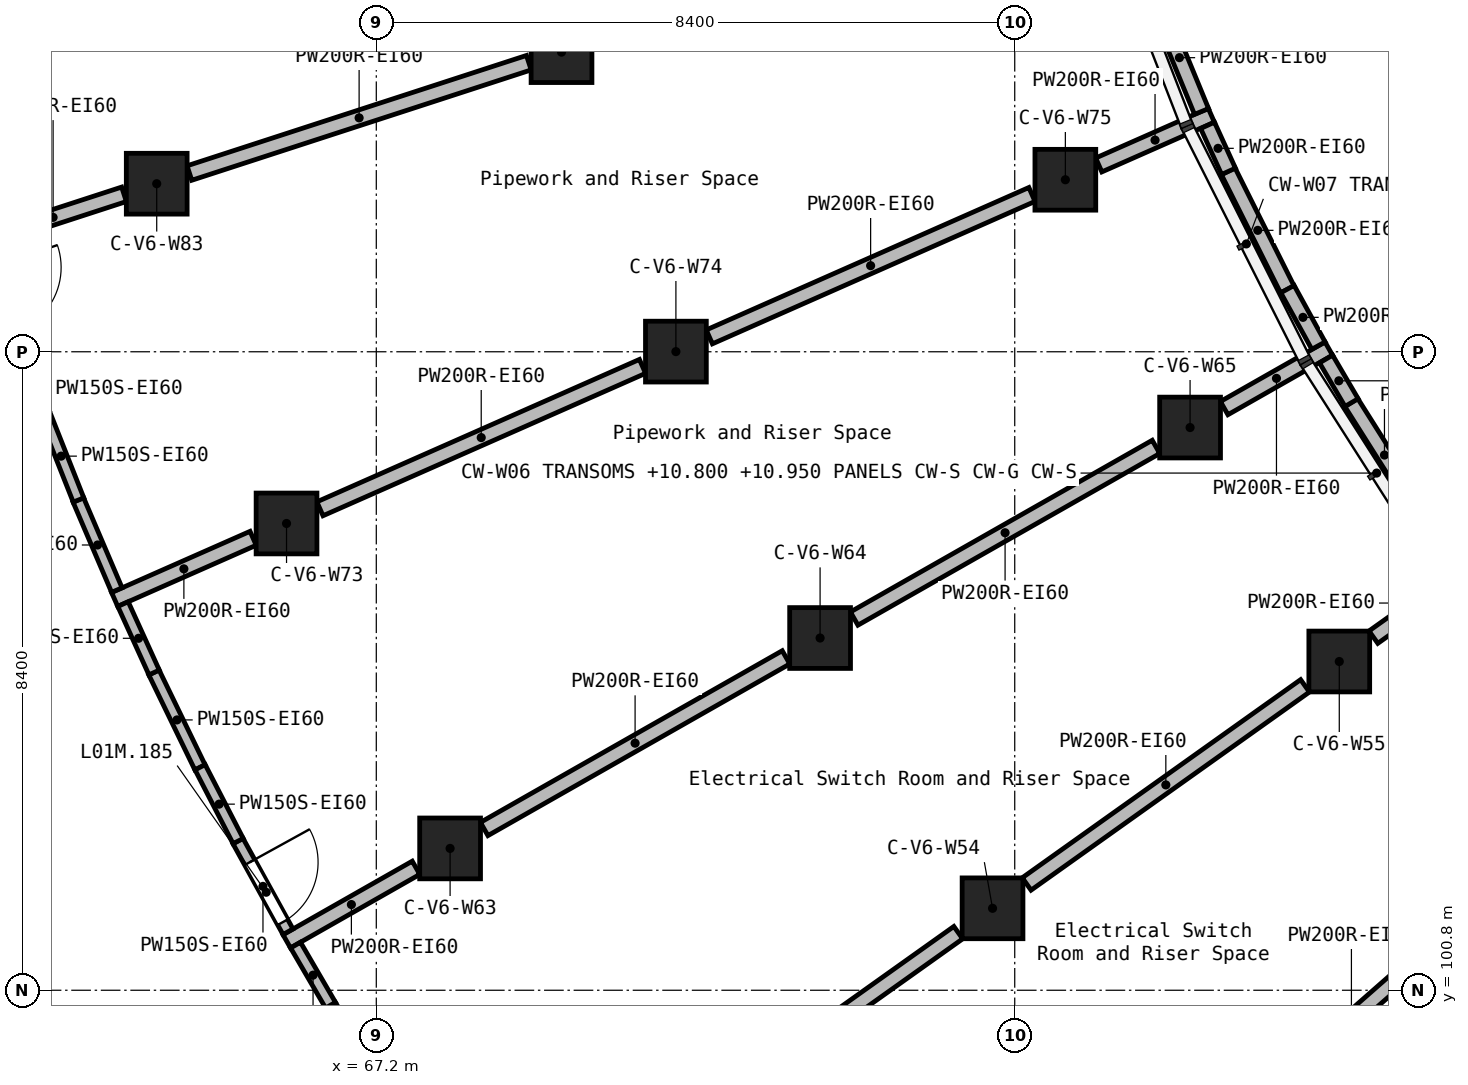
"""IFC4 building model, lengths in metres.
Left out: names, types, materials, properties, quantities, classifications, styles, units other than length and angle.
Written with IfcOpenShell. Run it as: python <this file> out.ifc"""

import sys

from ifc_helpers import new_model, si_unit, direction, frame, frame_2d, origin, origin_2d, place, context, subcontext, project, spatial, rectangle, extrude, element, fill, save


model = new_model("IFC4")
c1 = context("Model", 3, precision=1e-05, world=origin(), true_north=direction((0.0, 1.0)))
c2 = subcontext(c1, "Body", "Model", "MODEL_VIEW")
j1 = project(units=[si_unit("LENGTHUNIT", "METRE"), si_unit("PLANEANGLEUNIT", "RADIAN")], contexts=[c1])
p1 = place(None, origin())
s1 = spatial("IfcSite", under=j1, at=p1, CompositionType="ELEMENT")
p2 = place(p1, origin())
s2 = spatial("IfcBuilding", under=s1, at=p2, CompositionType="ELEMENT")
p3 = place(p2, frame((0.0, 0.0, 9.9)))
s3 = spatial("IfcBuildingStorey", under=s2, at=p3, CompositionType="ELEMENT", Elevation=9.9)
for number, where, z_axis, x_axis in (
    (1, (64.311, 111.411, 0.0), (0.0, 0.0, 1.0), (1.0, 0.0, 0.0)),
    (2, (66.019, 106.941, 0.0), (0.0, 0.0, 1.0), (1.0, 0.0, 0.0)),
    (3, (68.171, 102.666, 0.0), (0.0, 0.0, 1.0), (1.0, 0.0, 0.0)),
    (4, (69.637, 113.142, 0.0), (0.0, 0.0, 1.0), (1.0, 0.0, 0.0)),
    (5, (71.142, 109.202, 0.0), (0.0, 0.0, 1.0), (1.0, 0.0, 0.0)),
    (6, (73.039, 105.434, 0.0), (0.0, 0.0, 1.0), (1.0, 0.0, 0.0)),
    (7, (75.308, 101.878, 0.0), (0.0, 0.0, 1.0), (1.0, 0.0, 0.0)),
    (8, (76.266, 111.463, 0.0), (0.0, 0.0, 1.0), (1.0, 0.0, 0.0)),
    (9, (77.907, 108.203, 0.0), (0.0, 0.0, 1.0), (1.0, 0.0, 0.0)),
    (10, (79.87, 105.125, 0.0), (0.0, 0.0, 1.0), (1.0, 0.0, 0.0)),
):
    element("IfcColumn", number, at=place(p3, frame(where, z_axis=z_axis, x_axis=x_axis)), inside=s3, PredefinedType="COLUMN", context=c2, shape_type="SweptSolid", body=[
        extrude(rectangle(XDim=0.8, YDim=0.8, at=origin_2d()), origin(), (0.0, 0.0, 1.0), 2.7),
    ])
p4 = place(p3, frame((63.757, 105.942, 0.0), z_axis=(0.0, 0.0, 1.0), x_axis=(0.91480459559, 0.403896709429, 0.0)))
e11 = element("IfcWall", 11, at=p4, inside=s3, PredefinedType="SOLIDWALL", context=c2, shape_type="SweptSolid", body=[
    extrude(rectangle(XDim=1.992, YDim=0.2, at=frame_2d((0.996, 0.0))), origin(), (0.0, 0.0, 1.0), 2.45),
])
p5 = place(p3, frame((66.458, 107.134, 0.0), z_axis=(0.0, 0.0, 1.0), x_axis=(0.914820027479, 0.403861755213, 0.0)))
e12 = element("IfcWall", 12, at=p5, inside=s3, PredefinedType="SOLIDWALL", context=c2, shape_type="SweptSolid", body=[
    extrude(rectangle(XDim=4.639, YDim=0.2, at=frame_2d((2.32, 0.0))), origin(), (0.0, 0.0, 1.0), 2.45),
])
p6 = place(p3, frame((71.582, 109.396, 0.0), z_axis=(0.0, 0.0, 1.0), x_axis=(0.914834914902, 0.40382803082, 0.0)))
e13 = element("IfcWall", 13, at=p6, inside=s3, PredefinedType="SOLIDWALL", context=c2, shape_type="SweptSolid", body=[
    extrude(rectangle(XDim=4.64, YDim=0.2, at=frame_2d((2.32, 0.0))), origin(), (0.0, 0.0, 1.0), 2.45),
])
p7 = place(p3, frame((76.706, 111.658, 0.0), z_axis=(0.0, 0.0, 1.0), x_axis=(0.914871927274, 0.403744172323, 0.0)))
e14 = element("IfcWall", 14, at=p7, inside=s3, PredefinedType="SOLIDWALL", context=c2, shape_type="SweptSolid", body=[
    extrude(rectangle(XDim=1.619, YDim=0.2, at=frame_2d((0.809, 0.0))), origin(), (0.0, 0.0, 1.0), 2.45),
])
p8 = place(p3, frame((66.022, 101.444, 0.0), z_axis=(0.0, 0.0, 1.0), x_axis=(0.869270144925, 0.494337349532, 0.0)))
e15 = element("IfcWall", 15, at=p8, inside=s3, PredefinedType="SOLIDWALL", context=c2, shape_type="SweptSolid", body=[
    extrude(rectangle(XDim=1.957, YDim=0.2, at=frame_2d((0.979, 0.0))), origin(), (0.0, 0.0, 1.0), 2.45),
])
p9 = place(p3, frame((68.619, 102.921, 0.0), z_axis=(0.0, 0.0, 1.0), x_axis=(0.869273909114, 0.494330730315, 0.0)))
e16 = element("IfcWall", 16, at=p9, inside=s3, PredefinedType="SOLIDWALL", context=c2, shape_type="SweptSolid", body=[
    extrude(rectangle(XDim=4.568, YDim=0.2, at=frame_2d((2.284, 0.0))), origin(), (0.0, 0.0, 1.0), 2.45),
])
p10 = place(p3, frame((73.487, 105.69, 0.0), z_axis=(0.0, 0.0, 1.0), x_axis=(0.869250944646, 0.49437111084, 0.0)))
e17 = element("IfcWall", 17, at=p10, inside=s3, PredefinedType="SOLIDWALL", context=c2, shape_type="SweptSolid", body=[
    extrude(rectangle(XDim=4.569, YDim=0.2, at=frame_2d((2.284, 0.0))), origin(), (0.0, 0.0, 1.0), 2.45),
])
p11 = place(p3, frame((78.355, 108.458, 0.0), z_axis=(0.0, 0.0, 1.0), x_axis=(0.869218667817, 0.49442785876, 0.0)))
e18 = element("IfcWall", 18, at=p11, inside=s3, PredefinedType="SOLIDWALL", context=c2, shape_type="SweptSolid", body=[
    extrude(rectangle(XDim=1.583, YDim=0.2, at=frame_2d((0.792, 0.0))), origin(), (0.0, 0.0, 1.0), 2.45),
])
for number, where, z_axis, x_axis in (
    (19, (71.195, 98.951, 0.0), (0.0, 0.0, 1.0), (0.815, 0.58, 0.0)),
    (20, (75.757, 102.198, 0.0), (0.0, 0.0, 1.0), (0.815, 0.58, 0.0)),
):
    element("IfcWall", number, at=place(p3, frame(where, z_axis=z_axis, x_axis=x_axis)), inside=s3, PredefinedType="SOLIDWALL", context=c2, shape_type="SweptSolid", body=[
        extrude(rectangle(XDim=4.495, YDim=0.2, at=frame_2d((2.248, 0.0))), origin(), (0.0, 0.0, 1.0), 2.45),
    ])
p12 = place(p3, frame((80.319, 105.445, 0.0), z_axis=(0.0, 0.0, 1.0), x_axis=(0.81475502869, 0.579805349428, 0.0)))
e21 = element("IfcWall", 21, at=p12, inside=s3, PredefinedType="SOLIDWALL", context=c2, shape_type="SweptSolid", body=[
    extrude(rectangle(XDim=1.548, YDim=0.2, at=frame_2d((0.774, 0.0))), origin(), (0.0, 0.0, 1.0), 2.45),
])
p13 = place(p3, frame((78.296, 98.896, 0.0), z_axis=(0.0, 0.0, 1.0), x_axis=(0.751815287375, 0.659373773871, 0.0)))
e22 = element("IfcWall", 22, at=p13, inside=s3, PredefinedType="SOLIDWALL", context=c2, shape_type="SweptSolid", body=[
    extrude(rectangle(XDim=4.611, YDim=0.2, at=frame_2d((2.306, 0.0))), origin(), (0.0, 0.0, 1.0), 2.45),
])
p14 = place(p3, frame((62.015, 110.665, 0.0), z_axis=(0.0, 0.0, 1.0), x_axis=(0.950996571819, 0.309201423652, 0.0)))
e23 = element("IfcWall", 23, at=p14, inside=s3, PredefinedType="SOLIDWALL", context=c2, shape_type="SweptSolid", body=[
    extrude(rectangle(XDim=1.962, YDim=0.2, at=frame_2d((0.981, 0.0))), origin(), (0.0, 0.0, 1.0), 2.45),
])
p15 = place(p3, frame((64.741, 111.552, 0.0), z_axis=(0.0, 0.0, 1.0), x_axis=(0.950996999886, 0.309200107065, 0.0)))
e24 = element("IfcWall", 24, at=p15, inside=s3, PredefinedType="SOLIDWALL", context=c2, shape_type="SweptSolid", body=[
    extrude(rectangle(XDim=4.696, YDim=0.2, at=frame_2d((2.348, 0.0))), origin(), (0.0, 0.0, 1.0), 2.45),
])
p16 = place(p3, frame((77.475, 113.777, 0.0), z_axis=(0.0, 0.0, 1.0), x_axis=(0.38058139717, -0.924747425046, 0.0)))
e25 = element("IfcWall", 25, at=p16, inside=s3, PredefinedType="SOLIDWALL", context=c2, shape_type="SweptSolid", body=[
    extrude(rectangle(XDim=1.531, YDim=0.2, at=frame_2d((0.766, 0.0))), origin(), (0.0, 0.0, 1.0), 2.45),
])
p17 = place(p3, frame((78.408, 111.575, 0.0), z_axis=(0.0, 0.0, 1.0), x_axis=(0.447494222103, -0.89428682266, 0.0)))
e26 = element("IfcWall", 26, at=p17, inside=s3, PredefinedType="SOLIDWALL", context=c2, shape_type="SweptSolid", body=[
    extrude(rectangle(XDim=1.74, YDim=0.2, at=frame_2d((0.87, 0.0))), origin(), (0.0, 0.0, 1.0), 2.45),
])
p18 = place(p3, frame((80.028, 108.532, 0.0), z_axis=(0.0, 0.0, 1.0), x_axis=(0.534110896363, -0.84541442523, 0.0)))
e27 = element("IfcWall", 27, at=p18, inside=s3, PredefinedType="SOLIDWALL", context=c2, shape_type="SweptSolid", body=[
    extrude(rectangle(XDim=1.636, YDim=0.2, at=frame_2d((0.818, 0.0))), origin(), (0.0, 0.0, 1.0), 2.45),
])
p19 = place(p3, frame((79.188, 110.024, 0.0), z_axis=(0.0, 0.0, 1.0), x_axis=(0.481089632331, -0.876671412596, 0.0)))
e28 = element("IfcWall", 28, at=p19, inside=s3, PredefinedType="SOLIDWALL", context=c2, shape_type="SweptSolid", body=[
    extrude(rectangle(XDim=0.848, YDim=0.2, at=frame_2d((0.424, 0.0))), origin(), (0.0, 0.0, 1.0), 2.45),
])
p20 = place(p3, frame((78.137, 112.179, 0.0), z_axis=(0.0, 0.0, 1.0), x_axis=(0.414770625864, -0.909926001343, 0.0)))
e29 = element("IfcWall", 29, at=p20, inside=s3, PredefinedType="SOLIDWALL", context=c2, shape_type="SweptSolid", body=[
    extrude(rectangle(XDim=0.665, YDim=0.2, at=frame_2d((0.333, 0.0))), origin(), (0.0, 0.0, 1.0), 2.45),
])
p21 = place(p3, frame((79.696, 109.104, 0.0), z_axis=(0.0, 0.0, 1.0), x_axis=(0.505493047434, -0.862830678057, 0.0)))
e30 = element("IfcWall", 30, at=p21, inside=s3, PredefinedType="SOLIDWALL", context=c2, shape_type="SweptSolid", body=[
    extrude(rectangle(XDim=0.664, YDim=0.2, at=frame_2d((0.332, 0.0))), origin(), (0.0, 0.0, 1.0), 2.45),
])
p22 = place(p3, frame((65.38, 102.764, 0.0), z_axis=(0.0, 0.0, 1.0), x_axis=(0.482660806307, -0.875807368121, 0.0)))
e31 = element("IfcWall", 31, at=p22, inside=s3, PredefinedType="PARTITIONING", context=c2, shape_type="SweptSolid", body=[
    extrude(rectangle(XDim=1.364, YDim=0.15, at=frame_2d((0.682, 0.0))), origin(), (0.0, 0.0, 1.0), 2.45),
])
p23 = place(p22, frame((0.32, 0.0, 0.0)))
e32 = element("IfcOpeningElement", 32, at=p23, cuts=e31, PredefinedType="OPENING", context=c2, shape_type="SweptSolid", body=[
    extrude(rectangle(XDim=0.9, YDim=2.1, at=frame_2d((0.45, 1.05))), frame((0.0, 0.085, 0.0), z_axis=(0.0, -1.0, 0.0), x_axis=(1.0, 0.0, 0.0)), (0.0, 0.0, 1.0), 0.17),
])
p24 = place(p3, frame((63.28, 107.251, 0.0), z_axis=(0.0, 0.0, 1.0), x_axis=(0.392891207532, -0.91958496021, 0.0)))
e33 = element("IfcWall", 33, at=p24, inside=s3, PredefinedType="PARTITIONING", context=c2, shape_type="SweptSolid", body=[
    extrude(rectangle(XDim=1.29, YDim=0.15, at=frame_2d((0.645, 0.0))), origin(), (0.0, 0.0, 1.0), 2.45),
])
p25 = place(p3, frame((66.596, 100.604, 0.0), z_axis=(0.0, 0.0, 1.0), x_axis=(0.524097425664, -0.851658316705, 0.0)))
e34 = element("IfcWall", 34, at=p25, inside=s3, PredefinedType="PARTITIONING", context=c2, shape_type="SweptSolid", body=[
    extrude(rectangle(XDim=1.39, YDim=0.15, at=frame_2d((0.695, 0.0))), origin(), (0.0, 0.0, 1.0), 2.45),
])
p26 = place(p3, frame((64.274, 104.981, 0.0), z_axis=(0.0, 0.0, 1.0), x_axis=(0.436355428291, -0.899774382943, 0.0)))
e35 = element("IfcWall", 35, at=p26, inside=s3, PredefinedType="PARTITIONING", context=c2, shape_type="SweptSolid", body=[
    extrude(rectangle(XDim=1.389, YDim=0.15, at=frame_2d((0.695, 0.0))), origin(), (0.0, 0.0, 1.0), 2.45),
])
p27 = place(p3, frame((62.825, 108.404, 0.0), z_axis=(0.0, 0.0, 1.0), x_axis=(0.367927959825, -0.929854298468, 0.0)))
e36 = element("IfcWall", 36, at=p27, inside=s3, PredefinedType="PARTITIONING", context=c2, shape_type="SweptSolid", body=[
    extrude(rectangle(XDim=1.241, YDim=0.15, at=frame_2d((0.621, 0.0))), origin(), (0.0, 0.0, 1.0), 2.45),
])
p28 = place(p3, frame((64.882, 103.734, 0.0), z_axis=(0.0, 0.0, 1.0), x_axis=(0.458529077121, -0.888679405317, 0.0)))
e37 = element("IfcWall", 37, at=p28, inside=s3, PredefinedType="PARTITIONING", context=c2, shape_type="SweptSolid", body=[
    extrude(rectangle(XDim=1.093, YDim=0.15, at=frame_2d((0.546, 0.0))), origin(), (0.0, 0.0, 1.0), 2.45),
])
p29 = place(p3, frame((63.868, 105.88, 0.0), z_axis=(0.0, 0.0, 1.0), x_axis=(0.413896028548, -0.910324160699, 0.0)))
e38 = element("IfcWall", 38, at=p29, inside=s3, PredefinedType="PARTITIONING", context=c2, shape_type="SweptSolid", body=[
    extrude(rectangle(XDim=0.988, YDim=0.15, at=frame_2d((0.494, 0.0))), origin(), (0.0, 0.0, 1.0), 2.45),
])
p30 = place(p3, frame((66.138, 101.394, 0.0), z_axis=(0.0, 0.0, 1.0), x_axis=(0.503306768909, -0.864107803674, 0.0)))
e39 = element("IfcWall", 39, at=p30, inside=s3, PredefinedType="PARTITIONING", context=c2, shape_type="SweptSolid", body=[
    extrude(rectangle(XDim=0.915, YDim=0.15, at=frame_2d((0.458, 0.0))), origin(), (0.0, 0.0, 1.0), 2.45),
])
p31 = place(p23, origin())
e40 = element("IfcDoor", 40, at=p31, inside=s3, OperationType="SINGLE_SWING_RIGHT", PredefinedType="DOOR", context=c2, shape_type="SweptSolid", body=[
    extrude(rectangle(XDim=0.9, YDim=2.1, at=frame_2d((0.45, 1.05))), frame((0.0, 0.025, 0.0), z_axis=(0.0, -1.0, 0.0), x_axis=(1.0, 0.0, 0.0)), (0.0, 0.0, 1.0), 0.05),
])
fill(e32, e40)
save(model, sys.argv[1])
